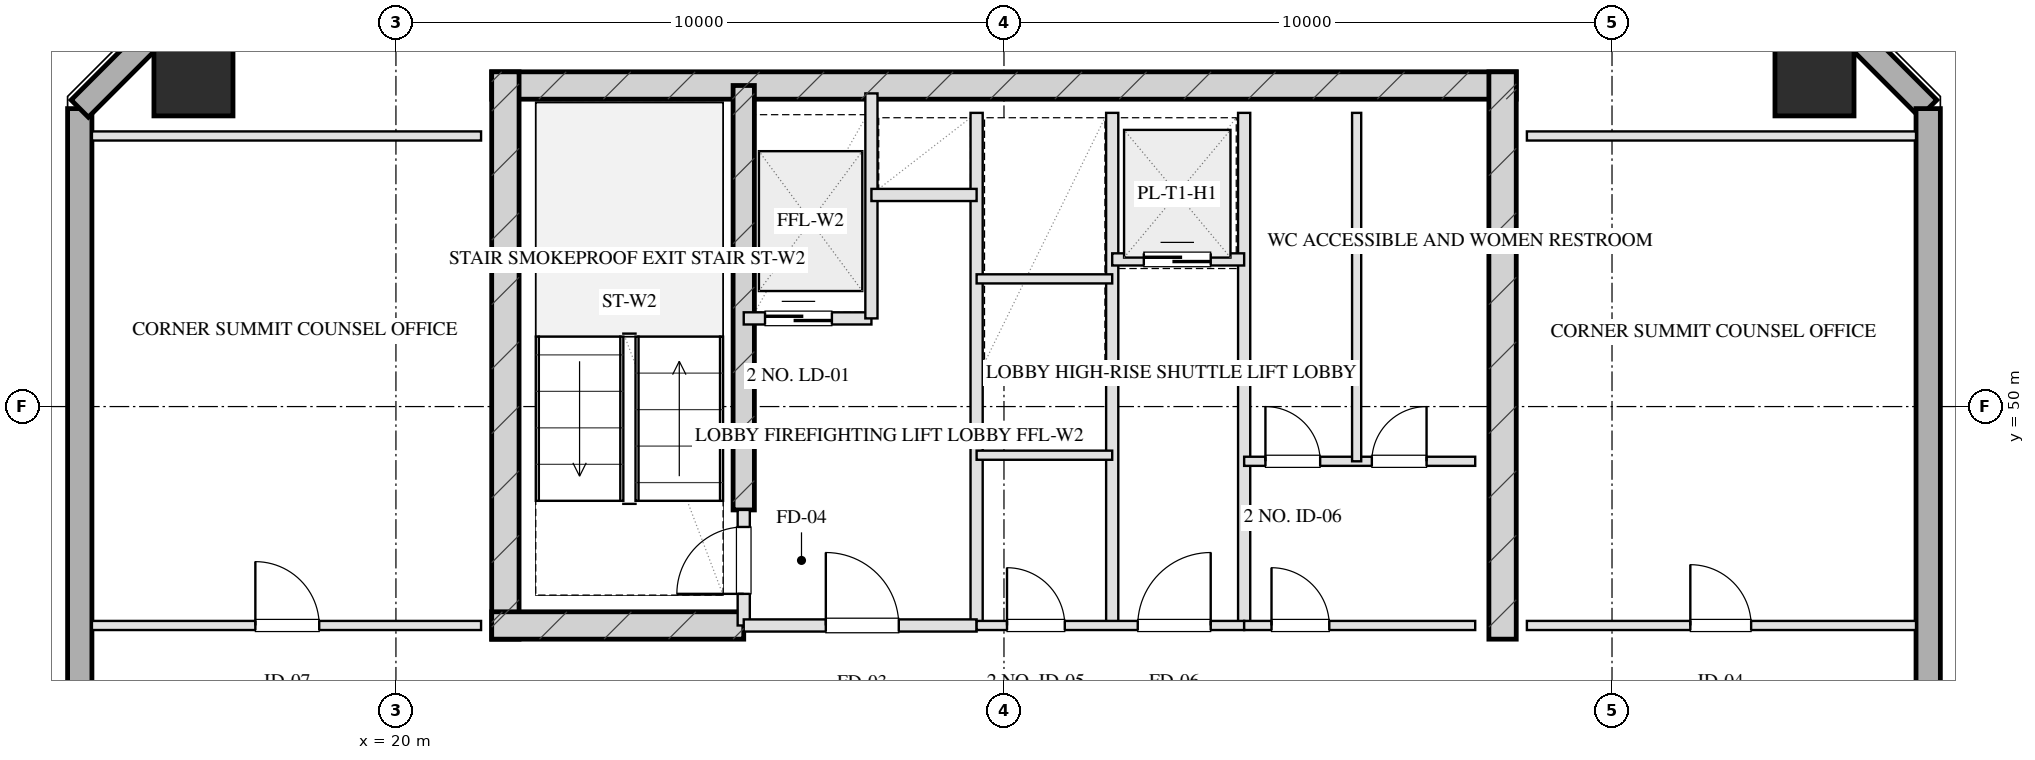
"""IFC4 building model, lengths in metres.
Left out: names, types, materials, properties, quantities, classifications, styles, units other than length and angle.
Written with IfcOpenShell. Run it as: python <this file> out.ifc"""

import sys

from ifc_helpers import new_model, si_unit, direction, frame, frame_2d, origin, origin_2d, place, context, subcontext, project, spatial, rectangle, hollow_rectangle, extrude, element, fill, save


model = new_model("IFC4")
c1 = context("Model", 3, precision=1e-05, world=origin(), true_north=direction((0.0, 1.0)))
c2 = subcontext(c1, "Body", "Model", "MODEL_VIEW")
j1 = project(units=[si_unit("LENGTHUNIT", "METRE"), si_unit("PLANEANGLEUNIT", "RADIAN")], contexts=[c1])
p1 = place(None, origin())
s1 = spatial("IfcSite", under=j1, at=p1, CompositionType="ELEMENT")
p2 = place(p1, origin())
s2 = spatial("IfcBuilding", under=s1, at=p2, CompositionType="ELEMENT")
p3 = place(p2, frame((0.0, 0.0, 260.0)))
s3 = spatial("IfcBuildingStorey", under=s2, at=p3, CompositionType="ELEMENT", Elevation=260.0)
p4 = place(p3, frame((21.575, 55.28, 0.0), z_axis=(0.0, 0.0, 1.0), x_axis=(1.0, 0.0, 0.0)))
e1 = element("IfcWall", 1, at=p4, inside=s3, PredefinedType="SHEAR", context=c2, shape_type="SweptSolid", body=[
    extrude(rectangle(XDim=16.85, YDim=0.45, at=frame_2d((8.425, 0.0))), origin(), (0.0, 0.0, 1.0), 3.2),
])
for number, where, z_axis, x_axis in (
    (2, (21.8, 46.175, 0.0), (0.0, 0.0, 1.0), (0.0, 1.0, 0.0)),
    (3, (38.2, 46.175, 0.0), (0.0, 0.0, 1.0), (0.0, 1.0, 0.0)),
):
    element("IfcWall", number, at=place(p3, frame(where, z_axis=z_axis, x_axis=x_axis)), inside=s3, PredefinedType="SHEAR", context=c2, shape_type="SweptSolid", body=[
        extrude(rectangle(XDim=9.33, YDim=0.45, at=frame_2d((4.665, 0.0))), origin(), (0.0, 0.0, 1.0), 3.2),
    ])
p5 = place(p3, frame((25.72, 48.3, 0.0), z_axis=(0.0, 0.0, 1.0), x_axis=(0.0, 1.0, 0.0)))
e4 = element("IfcWall", 4, at=p5, inside=s3, PredefinedType="SHEAR", context=c2, shape_type="SweptSolid", body=[
    extrude(rectangle(XDim=6.98, YDim=0.35, at=frame_2d((3.49, 0.0))), origin(), (0.0, 0.0, 1.0), 3.2),
])
p6 = place(p3, frame((21.575, 46.4, 0.0), z_axis=(0.0, 0.0, 1.0), x_axis=(1.0, 0.0, 0.0)))
e5 = element("IfcWall", 5, at=p6, inside=s3, PredefinedType="SHEAR", context=c2, shape_type="SweptSolid", body=[
    extrude(rectangle(XDim=4.145, YDim=0.45, at=frame_2d((2.073, 0.0))), origin(), (0.0, 0.0, 1.0), 3.2),
])
for number, where, z_axis, x_axis in (
    (6, (43.33, 55.43, 0.0), (0.0, 0.0, 1.0), (1.0, 0.0, 0.0)),
    (7, (16.67, 55.43, 0.0), (0.0, 0.0, 1.0), (1.0, 0.0, 0.0)),
):
    element("IfcColumn", number, at=place(p3, frame(where, z_axis=z_axis, x_axis=x_axis)), inside=s3, PredefinedType="COLUMN", context=c2, shape_type="SweptSolid", body=[
        extrude(hollow_rectangle(XDim=1.3, YDim=1.3, WallThickness=0.045, at=origin_2d()), origin(), (0.0, 0.0, 1.0), 3.201),
    ])
p7 = place(p3, frame((14.8, 13.1, 0.0), z_axis=(0.0, 0.0, 1.0), x_axis=(0.0, 1.0, 0.0)))
e8 = element("IfcWall", 8, at=p7, inside=s3, PredefinedType="SOLIDWALL", context=c2, shape_type="SweptSolid", body=[
    extrude(rectangle(XDim=41.8, YDim=0.4, at=frame_2d((20.9, 0.0))), origin(), (0.0, 0.0, 1.0), 2.36),
])
p8 = place(p7, frame((13.525, 0.0, 0.75)))
e9 = element("IfcOpeningElement", 9, at=p8, cuts=e8, PredefinedType="OPENING", context=c2, shape_type="SweptSolid", body=[
    extrude(rectangle(XDim=1.95, YDim=1.21, at=frame_2d((0.975, 0.605))), frame((0.0, 0.21, 0.0), z_axis=(0.0, -1.0, 0.0), x_axis=(1.0, 0.0, 0.0)), (0.0, 0.0, 1.0), 0.42),
])
p9 = place(p7, frame((17.325, 0.0, 0.75)))
e10 = element("IfcOpeningElement", 10, at=p9, cuts=e8, PredefinedType="OPENING", context=c2, shape_type="SweptSolid", body=[
    extrude(rectangle(XDim=1.95, YDim=1.21, at=frame_2d((0.975, 0.605))), frame((0.0, 0.21, 0.0), z_axis=(0.0, -1.0, 0.0), x_axis=(1.0, 0.0, 0.0)), (0.0, 0.0, 1.0), 0.42),
])
p10 = place(p7, frame((23.43, 0.0, 0.0)))
e11 = element("IfcOpeningElement", 11, at=p10, cuts=e8, PredefinedType="OPENING", context=c2, shape_type="SweptSolid", body=[
    extrude(rectangle(XDim=1.1, YDim=2.15, at=frame_2d((0.55, 1.075))), frame((0.0, 0.21, 0.0), z_axis=(0.0, -1.0, 0.0), x_axis=(1.0, 0.0, 0.0)), (0.0, 0.0, 1.0), 0.42),
])
for number, where, z_axis, x_axis in (
    (12, (14.8, 54.9, 0.0), (0.0, 0.0, 1.0), (0.707, 0.707, 0.0)),
    (13, (42.8, 57.3, 0.0), (0.0, 0.0, 1.0), (0.707, -0.707, 0.0)),
):
    element("IfcWall", number, at=place(p3, frame(where, z_axis=z_axis, x_axis=x_axis)), inside=s3, PredefinedType="SOLIDWALL", context=c2, shape_type="SweptSolid", body=[
        extrude(rectangle(XDim=3.394, YDim=0.4, at=frame_2d((1.697, 0.0))), origin(), (0.0, 0.0, 1.0), 2.36),
    ])
p11 = place(p3, frame((45.2, 54.9, 0.0), z_axis=(0.0, 0.0, 1.0), x_axis=(0.0, -1.0, 0.0)))
e14 = element("IfcWall", 14, at=p11, inside=s3, PredefinedType="SOLIDWALL", context=c2, shape_type="SweptSolid", body=[
    extrude(rectangle(XDim=41.8, YDim=0.4, at=frame_2d((20.9, 0.0))), origin(), (0.0, 0.0, 1.0), 2.36),
])
p12 = place(p11, frame((26.325, 0.0, 0.75)))
e15 = element("IfcOpeningElement", 15, at=p12, cuts=e14, PredefinedType="OPENING", context=c2, shape_type="SweptSolid", body=[
    extrude(rectangle(XDim=1.95, YDim=1.21, at=frame_2d((0.975, 0.605))), frame((0.0, 0.21, 0.0), z_axis=(0.0, -1.0, 0.0), x_axis=(1.0, 0.0, 0.0)), (0.0, 0.0, 1.0), 0.42),
])
p13 = place(p11, frame((22.525, 0.0, 0.75)))
e16 = element("IfcOpeningElement", 16, at=p13, cuts=e14, PredefinedType="OPENING", context=c2, shape_type="SweptSolid", body=[
    extrude(rectangle(XDim=1.95, YDim=1.21, at=frame_2d((0.975, 0.605))), frame((0.0, 0.21, 0.0), z_axis=(0.0, -1.0, 0.0), x_axis=(1.0, 0.0, 0.0)), (0.0, 0.0, 1.0), 0.42),
])
p14 = place(p11, frame((17.25, 0.0, 0.0)))
e17 = element("IfcOpeningElement", 17, at=p14, cuts=e14, PredefinedType="OPENING", context=c2, shape_type="SweptSolid", body=[
    extrude(rectangle(XDim=1.1, YDim=2.15, at=frame_2d((0.55, 1.075))), frame((0.0, 0.21, 0.0), z_axis=(0.0, -1.0, 0.0), x_axis=(1.0, 0.0, 0.0)), (0.0, 0.0, 1.0), 0.42),
])
p15 = place(p3, frame((25.72, 46.4, 0.0), z_axis=(0.0, 0.0, 1.0), x_axis=(0.0, 1.0, 0.0)))
e18 = element("IfcWall", 18, at=p15, inside=s3, PredefinedType="PARTITIONING", context=c2, shape_type="SweptSolid", body=[
    extrude(rectangle(XDim=1.9, YDim=0.2, at=frame_2d((0.95, 0.0))), origin(), (0.0, 0.0, 1.0), 2.925),
])
p16 = place(p15, frame((0.52, 0.0, 0.0)))
e19 = element("IfcOpeningElement", 19, at=p16, cuts=e18, PredefinedType="OPENING", context=c2, shape_type="SweptSolid", body=[
    extrude(rectangle(XDim=1.1, YDim=2.05, at=frame_2d((0.55, 1.025))), frame((0.0, 0.11, 0.0), z_axis=(0.0, -1.0, 0.0), x_axis=(1.0, 0.0, 0.0)), (0.0, 0.0, 1.0), 0.22),
])
p17 = place(p3, frame((29.55, 46.4, 0.0), z_axis=(0.0, 0.0, 1.0), x_axis=(0.0, 1.0, 0.0)))
e20 = element("IfcWall", 20, at=p17, inside=s3, PredefinedType="PARTITIONING", context=c2, shape_type="SweptSolid", body=[
    extrude(rectangle(XDim=8.43, YDim=0.2, at=frame_2d((4.215, 0.0))), origin(), (0.0, 0.0, 1.0), 2.925),
])
p18 = place(p3, frame((25.72, 46.4, 0.0), z_axis=(0.0, 0.0, 1.0), x_axis=(1.0, 0.0, 0.0)))
e21 = element("IfcWall", 21, at=p18, inside=s3, PredefinedType="PARTITIONING", context=c2, shape_type="SweptSolid", body=[
    extrude(rectangle(XDim=3.83, YDim=0.2, at=frame_2d((1.915, 0.0))), origin(), (0.0, 0.0, 1.0), 2.925),
])
p19 = place(p18, frame((1.35, 0.0, 0.0)))
e22 = element("IfcOpeningElement", 22, at=p19, cuts=e21, PredefinedType="OPENING", context=c2, shape_type="SweptSolid", body=[
    extrude(rectangle(XDim=1.2, YDim=2.05, at=frame_2d((0.6, 1.025))), frame((0.0, 0.11, 0.0), z_axis=(0.0, -1.0, 0.0), x_axis=(1.0, 0.0, 0.0)), (0.0, 0.0, 1.0), 0.22),
])
p20 = place(p3, frame((25.72, 51.45, 0.0), z_axis=(0.0, 0.0, 1.0), x_axis=(1.0, 0.0, 0.0)))
e23 = element("IfcWall", 23, at=p20, inside=s3, PredefinedType="PARTITIONING", context=c2, shape_type="SweptSolid", body=[
    extrude(rectangle(XDim=2.1, YDim=0.2, at=frame_2d((1.05, 0.0))), origin(), (0.0, 0.0, 1.0), 2.925),
])
p21 = place(p20, frame((0.35, 0.0, 0.0)))
e24 = element("IfcOpeningElement", 24, at=p21, cuts=e23, PredefinedType="OPENING", context=c2, shape_type="SweptSolid", body=[
    extrude(rectangle(XDim=1.1, YDim=2.05, at=frame_2d((0.55, 1.025))), frame((0.0, 0.11, 0.0), z_axis=(0.0, -1.0, 0.0), x_axis=(1.0, 0.0, 0.0)), (0.0, 0.0, 1.0), 0.22),
])
p22 = place(p3, frame((27.82, 51.45, 0.0), z_axis=(0.0, 0.0, 1.0), x_axis=(0.0, 1.0, 0.0)))
e25 = element("IfcWall", 25, at=p22, inside=s3, PredefinedType="PARTITIONING", context=c2, shape_type="SweptSolid", body=[
    extrude(rectangle(XDim=3.7, YDim=0.2, at=frame_2d((1.85, 0.0))), origin(), (0.0, 0.0, 1.0), 2.925),
])
p23 = place(p3, frame((27.82, 53.48, 0.0), z_axis=(0.0, 0.0, 1.0), x_axis=(1.0, 0.0, 0.0)))
e26 = element("IfcWall", 26, at=p23, inside=s3, PredefinedType="PARTITIONING", context=c2, shape_type="SweptSolid", body=[
    extrude(rectangle(XDim=1.73, YDim=0.2, at=frame_2d((0.865, 0.0))), origin(), (0.0, 0.0, 1.0), 2.925),
])
for number, where, z_axis, x_axis in (
    (27, (33.95, 46.4, 0.0), (0.0, 0.0, 1.0), (0.0, 1.0, 0.0)),
    (28, (31.78, 46.4, 0.0), (0.0, 0.0, 1.0), (0.0, 1.0, 0.0)),
):
    element("IfcWall", number, at=place(p3, frame(where, z_axis=z_axis, x_axis=x_axis)), inside=s3, PredefinedType="PARTITIONING", context=c2, shape_type="SweptSolid", body=[
        extrude(rectangle(XDim=8.43, YDim=0.2, at=frame_2d((4.215, 0.0))), origin(), (0.0, 0.0, 1.0), 2.925),
    ])
p24 = place(p3, frame((29.55, 46.4, 0.0), z_axis=(0.0, 0.0, 1.0), x_axis=(1.0, 0.0, 0.0)))
e29 = element("IfcWall", 29, at=p24, inside=s3, PredefinedType="PARTITIONING", context=c2, shape_type="SweptSolid", body=[
    extrude(rectangle(XDim=4.4, YDim=0.15, at=frame_2d((2.2, 0.0))), origin(), (0.0, 0.0, 1.0), 2.925),
])
p25 = place(p24, frame((0.5, 0.0, 0.0)))
e30 = element("IfcOpeningElement", 30, at=p25, cuts=e29, PredefinedType="OPENING", context=c2, shape_type="SweptSolid", body=[
    extrude(rectangle(XDim=0.95, YDim=2.05, at=frame_2d((0.475, 1.025))), frame((0.0, 0.085, 0.0), z_axis=(0.0, -1.0, 0.0), x_axis=(1.0, 0.0, 0.0)), (0.0, 0.0, 1.0), 0.17),
])
p26 = place(p24, frame((2.65, 0.0, 0.0)))
e31 = element("IfcOpeningElement", 31, at=p26, cuts=e29, PredefinedType="OPENING", context=c2, shape_type="SweptSolid", body=[
    extrude(rectangle(XDim=1.2, YDim=2.05, at=frame_2d((0.6, 1.025))), frame((0.0, 0.085, 0.0), z_axis=(0.0, -1.0, 0.0), x_axis=(1.0, 0.0, 0.0)), (0.0, 0.0, 1.0), 0.17),
])
for number, where, z_axis, x_axis in (
    (32, (29.55, 49.2, 0.0), (0.0, 0.0, 1.0), (1.0, 0.0, 0.0)),
    (33, (29.55, 52.1, 0.0), (0.0, 0.0, 1.0), (1.0, 0.0, 0.0)),
):
    element("IfcWall", number, at=place(p3, frame(where, z_axis=z_axis, x_axis=x_axis)), inside=s3, PredefinedType="PARTITIONING", context=c2, shape_type="SweptSolid", body=[
        extrude(rectangle(XDim=2.23, YDim=0.15, at=frame_2d((1.115, 0.0))), origin(), (0.0, 0.0, 1.0), 2.925),
    ])
p27 = place(p3, frame((31.78, 52.42, 0.0), z_axis=(0.0, 0.0, 1.0), x_axis=(1.0, 0.0, 0.0)))
e34 = element("IfcWall", 34, at=p27, inside=s3, PredefinedType="PARTITIONING", context=c2, shape_type="SweptSolid", body=[
    extrude(rectangle(XDim=2.17, YDim=0.2, at=frame_2d((1.085, 0.0))), origin(), (0.0, 0.0, 1.0), 2.925),
])
p28 = place(p27, frame((0.52, 0.0, 0.0)))
e35 = element("IfcOpeningElement", 35, at=p28, cuts=e34, PredefinedType="OPENING", context=c2, shape_type="SweptSolid", body=[
    extrude(rectangle(XDim=1.1, YDim=2.05, at=frame_2d((0.55, 1.025))), frame((0.0, 0.11, 0.0), z_axis=(0.0, -1.0, 0.0), x_axis=(1.0, 0.0, 0.0)), (0.0, 0.0, 1.0), 0.22),
])
p29 = place(p3, frame((33.95, 46.4, 0.0), z_axis=(0.0, 0.0, 1.0), x_axis=(1.0, 0.0, 0.0)))
e36 = element("IfcWall", 36, at=p29, inside=s3, PredefinedType="PARTITIONING", context=c2, shape_type="SweptSolid", body=[
    extrude(rectangle(XDim=3.8, YDim=0.15, at=frame_2d((1.9, 0.0))), origin(), (0.0, 0.0, 1.0), 2.925),
])
p30 = place(p29, frame((0.45, 0.0, 0.0)))
e37 = element("IfcOpeningElement", 37, at=p30, cuts=e36, PredefinedType="OPENING", context=c2, shape_type="SweptSolid", body=[
    extrude(rectangle(XDim=0.95, YDim=2.05, at=frame_2d((0.475, 1.025))), frame((0.0, 0.085, 0.0), z_axis=(0.0, -1.0, 0.0), x_axis=(1.0, 0.0, 0.0)), (0.0, 0.0, 1.0), 0.17),
])
p31 = place(p3, frame((33.95, 49.1, 0.0), z_axis=(0.0, 0.0, 1.0), x_axis=(1.0, 0.0, 0.0)))
e38 = element("IfcWall", 38, at=p31, inside=s3, PredefinedType="PARTITIONING", context=c2, shape_type="SweptSolid", body=[
    extrude(rectangle(XDim=3.8, YDim=0.15, at=frame_2d((1.9, 0.0))), origin(), (0.0, 0.0, 1.0), 2.925),
])
p32 = place(p31, frame((0.35, 0.0, 0.0)))
e39 = element("IfcOpeningElement", 39, at=p32, cuts=e38, PredefinedType="OPENING", context=c2, shape_type="SweptSolid", body=[
    extrude(rectangle(XDim=0.9, YDim=2.05, at=frame_2d((0.45, 1.025))), frame((0.0, 0.085, 0.0), z_axis=(0.0, -1.0, 0.0), x_axis=(1.0, 0.0, 0.0)), (0.0, 0.0, 1.0), 0.17),
])
p33 = place(p31, frame((2.1, 0.0, 0.0)))
e40 = element("IfcOpeningElement", 40, at=p33, cuts=e38, PredefinedType="OPENING", context=c2, shape_type="SweptSolid", body=[
    extrude(rectangle(XDim=0.9, YDim=2.05, at=frame_2d((0.45, 1.025))), frame((0.0, 0.085, 0.0), z_axis=(0.0, -1.0, 0.0), x_axis=(1.0, 0.0, 0.0)), (0.0, 0.0, 1.0), 0.17),
])
p34 = place(p3, frame((35.8, 49.1, 0.0), z_axis=(0.0, 0.0, 1.0), x_axis=(0.0, 1.0, 0.0)))
e41 = element("IfcWall", 41, at=p34, inside=s3, PredefinedType="PARTITIONING", context=c2, shape_type="SweptSolid", body=[
    extrude(rectangle(XDim=5.73, YDim=0.15, at=frame_2d((2.865, 0.0))), origin(), (0.0, 0.0, 1.0), 2.925),
])
p35 = place(p3, frame((15.0, 54.45, 0.0), z_axis=(0.0, 0.0, 1.0), x_axis=(1.0, 0.0, 0.0)))
e42 = element("IfcWall", 42, at=p35, inside=s3, PredefinedType="PARTITIONING", context=c2, shape_type="SweptSolid", body=[
    extrude(rectangle(XDim=6.4, YDim=0.15, at=frame_2d((3.2, 0.0))), origin(), (0.0, 0.0, 1.0), 2.925),
])
p36 = place(p3, frame((15.0, 46.4, 0.0), z_axis=(0.0, 0.0, 1.0), x_axis=(1.0, 0.0, 0.0)))
e43 = element("IfcWall", 43, at=p36, inside=s3, PredefinedType="PARTITIONING", context=c2, shape_type="SweptSolid", body=[
    extrude(rectangle(XDim=6.4, YDim=0.15, at=frame_2d((3.2, 0.0))), origin(), (0.0, 0.0, 1.0), 2.925),
])
p37 = place(p36, frame((2.688, 0.0, 0.0)))
e44 = element("IfcOpeningElement", 44, at=p37, cuts=e43, PredefinedType="OPENING", context=c2, shape_type="SweptSolid", body=[
    extrude(rectangle(XDim=1.05, YDim=2.05, at=frame_2d((0.525, 1.025))), frame((0.0, 0.085, 0.0), z_axis=(0.0, -1.0, 0.0), x_axis=(1.0, 0.0, 0.0)), (0.0, 0.0, 1.0), 0.17),
])
p38 = place(p3, frame((38.6, 54.45, 0.0), z_axis=(0.0, 0.0, 1.0), x_axis=(1.0, 0.0, 0.0)))
e45 = element("IfcWall", 45, at=p38, inside=s3, PredefinedType="PARTITIONING", context=c2, shape_type="SweptSolid", body=[
    extrude(rectangle(XDim=6.4, YDim=0.15, at=frame_2d((3.2, 0.0))), origin(), (0.0, 0.0, 1.0), 2.925),
])
p39 = place(p3, frame((38.6, 46.4, 0.0), z_axis=(0.0, 0.0, 1.0), x_axis=(1.0, 0.0, 0.0)))
e46 = element("IfcWall", 46, at=p39, inside=s3, PredefinedType="PARTITIONING", context=c2, shape_type="SweptSolid", body=[
    extrude(rectangle(XDim=6.4, YDim=0.15, at=frame_2d((3.2, 0.0))), origin(), (0.0, 0.0, 1.0), 2.925),
])
p40 = place(p39, frame((2.688, 0.0, 0.0)))
e47 = element("IfcOpeningElement", 47, at=p40, cuts=e46, PredefinedType="OPENING", context=c2, shape_type="SweptSolid", body=[
    extrude(rectangle(XDim=1.0, YDim=2.05, at=frame_2d((0.5, 1.025))), frame((0.0, 0.085, 0.0), z_axis=(0.0, -1.0, 0.0), x_axis=(1.0, 0.0, 0.0)), (0.0, 0.0, 1.0), 0.17),
])
p41 = place(p16, origin())
e48 = element("IfcDoor", 48, at=p41, inside=s3, OperationType="SINGLE_SWING_LEFT", PredefinedType="DOOR", context=c2, shape_type="SweptSolid", body=[
    extrude(rectangle(XDim=1.1, YDim=2.05, at=frame_2d((0.55, 1.025))), frame((0.0, 0.025, 0.0), z_axis=(0.0, -1.0, 0.0), x_axis=(1.0, 0.0, 0.0)), (0.0, 0.0, 1.0), 0.05),
])
fill(e19, e48)
p42 = place(p19, origin())
e49 = element("IfcDoor", 49, at=p42, inside=s3, OperationType="SINGLE_SWING_LEFT", PredefinedType="DOOR", context=c2, shape_type="SweptSolid", body=[
    extrude(rectangle(XDim=1.2, YDim=2.05, at=frame_2d((0.6, 1.025))), frame((0.0, 0.025, 0.0), z_axis=(0.0, -1.0, 0.0), x_axis=(1.0, 0.0, 0.0)), (0.0, 0.0, 1.0), 0.05),
])
fill(e22, e49)
p43 = place(p21, origin())
e50 = element("IfcDoor", 50, at=p43, inside=s3, OperationType="DOUBLE_DOOR_SLIDING", PredefinedType="DOOR", context=c2, shape_type="SweptSolid", body=[
    extrude(rectangle(XDim=1.1, YDim=2.05, at=frame_2d((0.55, 1.025))), frame((0.0, 0.025, 0.0), z_axis=(0.0, -1.0, 0.0), x_axis=(1.0, 0.0, 0.0)), (0.0, 0.0, 1.0), 0.05),
])
fill(e24, e50)
p44 = place(p25, origin())
e51 = element("IfcDoor", 51, at=p44, inside=s3, OperationType="SINGLE_SWING_LEFT", PredefinedType="DOOR", context=c2, shape_type="SweptSolid", body=[
    extrude(rectangle(XDim=0.95, YDim=2.05, at=frame_2d((0.475, 1.025))), frame((0.0, 0.025, 0.0), z_axis=(0.0, -1.0, 0.0), x_axis=(1.0, 0.0, 0.0)), (0.0, 0.0, 1.0), 0.05),
])
fill(e30, e51)
p45 = place(p26, origin())
e52 = element("IfcDoor", 52, at=p45, inside=s3, OperationType="SINGLE_SWING_RIGHT", PredefinedType="DOOR", context=c2, shape_type="SweptSolid", body=[
    extrude(rectangle(XDim=1.2, YDim=2.05, at=frame_2d((0.6, 1.025))), frame((0.0, 0.025, 0.0), z_axis=(0.0, -1.0, 0.0), x_axis=(1.0, 0.0, 0.0)), (0.0, 0.0, 1.0), 0.05),
])
fill(e31, e52)
p46 = place(p28, origin())
e53 = element("IfcDoor", 53, at=p46, inside=s3, OperationType="DOUBLE_DOOR_SLIDING", PredefinedType="DOOR", context=c2, shape_type="SweptSolid", body=[
    extrude(rectangle(XDim=1.1, YDim=2.05, at=frame_2d((0.55, 1.025))), frame((0.0, 0.025, 0.0), z_axis=(0.0, -1.0, 0.0), x_axis=(1.0, 0.0, 0.0)), (0.0, 0.0, 1.0), 0.05),
])
fill(e35, e53)
p47 = place(p30, origin())
e54 = element("IfcDoor", 54, at=p47, inside=s3, OperationType="SINGLE_SWING_LEFT", PredefinedType="DOOR", context=c2, shape_type="SweptSolid", body=[
    extrude(rectangle(XDim=0.95, YDim=2.05, at=frame_2d((0.475, 1.025))), frame((0.0, 0.025, 0.0), z_axis=(0.0, -1.0, 0.0), x_axis=(1.0, 0.0, 0.0)), (0.0, 0.0, 1.0), 0.05),
])
fill(e37, e54)
p48 = place(p32, origin())
e55 = element("IfcDoor", 55, at=p48, inside=s3, OperationType="SINGLE_SWING_LEFT", PredefinedType="DOOR", context=c2, shape_type="SweptSolid", body=[
    extrude(rectangle(XDim=0.9, YDim=2.05, at=frame_2d((0.45, 1.025))), frame((0.0, 0.025, 0.0), z_axis=(0.0, -1.0, 0.0), x_axis=(1.0, 0.0, 0.0)), (0.0, 0.0, 1.0), 0.05),
])
fill(e39, e55)
p49 = place(p33, origin())
e56 = element("IfcDoor", 56, at=p49, inside=s3, OperationType="SINGLE_SWING_RIGHT", PredefinedType="DOOR", context=c2, shape_type="SweptSolid", body=[
    extrude(rectangle(XDim=0.9, YDim=2.05, at=frame_2d((0.45, 1.025))), frame((0.0, 0.025, 0.0), z_axis=(0.0, -1.0, 0.0), x_axis=(1.0, 0.0, 0.0)), (0.0, 0.0, 1.0), 0.05),
])
fill(e40, e56)
p50 = place(p37, origin())
e57 = element("IfcDoor", 57, at=p50, inside=s3, OperationType="SINGLE_SWING_LEFT", PredefinedType="DOOR", context=c2, shape_type="SweptSolid", body=[
    extrude(rectangle(XDim=1.05, YDim=2.05, at=frame_2d((0.525, 1.025))), frame((0.0, 0.025, 0.0), z_axis=(0.0, -1.0, 0.0), x_axis=(1.0, 0.0, 0.0)), (0.0, 0.0, 1.0), 0.05),
])
fill(e44, e57)
p51 = place(p40, origin())
e58 = element("IfcDoor", 58, at=p51, inside=s3, OperationType="SINGLE_SWING_LEFT", PredefinedType="DOOR", context=c2, shape_type="SweptSolid", body=[
    extrude(rectangle(XDim=1.0, YDim=2.05, at=frame_2d((0.5, 1.025))), frame((0.0, 0.025, 0.0), z_axis=(0.0, -1.0, 0.0), x_axis=(1.0, 0.0, 0.0)), (0.0, 0.0, 1.0), 0.05),
])
fill(e47, e58)
save(model, sys.argv[1])
